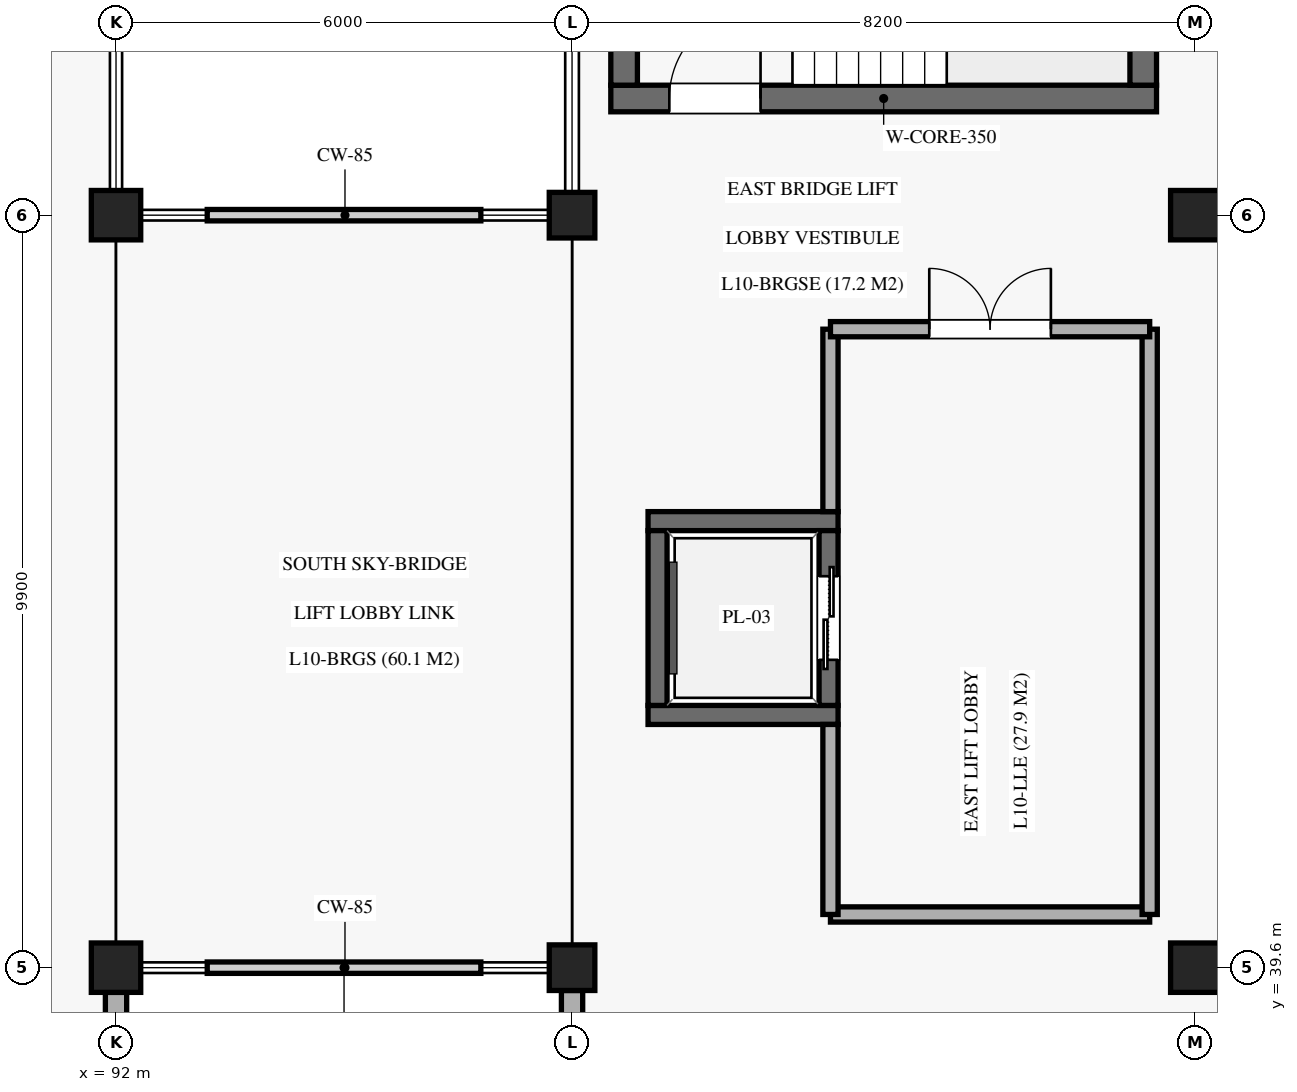
"""IFC4 building model, lengths in metres.
Left out: names, types, materials, properties, quantities, classifications, styles, units other than length and angle.
Written with IfcOpenShell. Run it as: python <this file> out.ifc"""

import sys

from ifc_helpers import new_model, si_unit, direction, frame, frame_2d, origin, origin_2d, place, context, subcontext, project, spatial, rectangle, extrude, element, fill, save


model = new_model("IFC4")
c1 = context("Model", 3, precision=1e-05, world=origin(), true_north=direction((0.0, 1.0)))
c2 = subcontext(c1, "Body", "Model", "MODEL_VIEW")
j1 = project(units=[si_unit("LENGTHUNIT", "METRE"), si_unit("PLANEANGLEUNIT", "RADIAN")], contexts=[c1])
p1 = place(None, origin())
s1 = spatial("IfcSite", under=j1, at=p1, CompositionType="ELEMENT")
p2 = place(p1, origin())
s2 = spatial("IfcBuilding", under=s1, at=p2, CompositionType="ELEMENT")
p3 = place(p2, frame((0.0, 0.0, 52.02)))
s3 = spatial("IfcBuildingStorey", under=s2, at=p3, CompositionType="ELEMENT", Elevation=52.02)
for number, where, z_axis, x_axis in (
    (1, (92.0, 39.6, 0.0), (0.0, 0.0, 1.0), (1.0, 0.0, 0.0)),
    (2, (92.0, 49.5, 0.0), (0.0, 0.0, 1.0), (1.0, 0.0, 0.0)),
):
    element("IfcColumn", number, at=place(p3, frame(where, z_axis=z_axis, x_axis=x_axis)), inside=s3, PredefinedType="COLUMN", context=c2, shape_type="SweptSolid", body=[
        extrude(rectangle(XDim=0.65, YDim=0.65, at=origin_2d()), origin(), (0.0, 0.0, 1.0), 5.1),
    ])
for number, where, z_axis, x_axis in (
    (3, (98.0, 39.6, 0.0), (0.0, 0.0, 1.0), (1.0, 0.0, 0.0)),
    (4, (98.0, 49.5, 0.0), (0.0, 0.0, 1.0), (1.0, 0.0, 0.0)),
):
    element("IfcColumn", number, at=place(p3, frame(where, z_axis=z_axis, x_axis=x_axis)), inside=s3, PredefinedType="COLUMN", context=c2, shape_type="SweptSolid", body=[
        extrude(rectangle(XDim=0.6, YDim=0.6, at=origin_2d()), origin(), (0.0, 0.0, 1.0), 5.1),
    ])
for number, where, z_axis, x_axis in (
    (5, (106.2, 39.6, 0.0), (0.0, 0.0, 1.0), (1.0, 0.0, 0.0)),
    (6, (106.2, 49.5, 0.0), (0.0, 0.0, 1.0), (1.0, 0.0, 0.0)),
):
    element("IfcColumn", number, at=place(p3, frame(where, z_axis=z_axis, x_axis=x_axis)), inside=s3, PredefinedType="COLUMN", context=c2, shape_type="SweptSolid", body=[
        extrude(rectangle(XDim=0.65, YDim=0.65, at=origin_2d()), origin(), (0.0, 0.0, 1.0), 5.1),
    ])
p4 = place(p3, frame((92.0, 30.025, 0.0), z_axis=(0.0, 0.0, 1.0), x_axis=(0.0, 1.0, 0.0)))
e7 = element("IfcWall", 7, at=p4, inside=s3, PredefinedType="SOLIDWALL", context=c2, shape_type="SweptSolid", body=[
    extrude(rectangle(XDim=9.25, YDim=0.28, at=frame_2d((4.625, 0.0))), origin(), (0.0, 0.0, 1.0), 4.1),
])
p5 = place(p4, frame((3.625, 0.0, 1.45)))
e8 = element("IfcOpeningElement", 8, at=p5, cuts=e7, PredefinedType="OPENING", context=c2, shape_type="SweptSolid", body=[
    extrude(rectangle(XDim=1.8, YDim=1.7, at=frame_2d((0.9, 0.85))), frame((0.0, 0.15, 0.0), z_axis=(0.0, -1.0, 0.0), x_axis=(1.0, 0.0, 0.0)), (0.0, 0.0, 1.0), 0.3),
])
p6 = place(p3, frame((98.0, 30.0, 0.0), z_axis=(0.0, 0.0, 1.0), x_axis=(0.0, 1.0, 0.0)))
e9 = element("IfcWall", 9, at=p6, inside=s3, PredefinedType="SOLIDWALL", context=c2, shape_type="SweptSolid", body=[
    extrude(rectangle(XDim=9.3, YDim=0.28, at=frame_2d((4.65, 0.0))), origin(), (0.0, 0.0, 1.0), 4.1),
])
p7 = place(p6, frame((3.65, 0.0, 1.45)))
e10 = element("IfcOpeningElement", 10, at=p7, cuts=e9, PredefinedType="OPENING", context=c2, shape_type="SweptSolid", body=[
    extrude(rectangle(XDim=2.5, YDim=1.6, at=frame_2d((1.25, 0.8))), frame((0.0, 0.15, 0.0), z_axis=(0.0, -1.0, 0.0), x_axis=(1.0, 0.0, 0.0)), (0.0, 0.0, 1.0), 0.3),
])
p8 = place(p3, frame((98.51, 51.035, 0.0), z_axis=(0.0, 0.0, 1.0), x_axis=(1.0, 0.0, 0.0)))
e11 = element("IfcWall", 11, at=p8, inside=s3, PredefinedType="SHEAR", context=c2, shape_type="SweptSolid", body=[
    extrude(rectangle(XDim=7.18, YDim=0.35, at=frame_2d((3.59, 0.0))), origin(), (0.0, 0.0, 1.0), 4.85),
])
p9 = place(p8, frame((0.77, 0.0, 0.0)))
e12 = element("IfcOpeningElement", 12, at=p9, cuts=e11, PredefinedType="OPENING", context=c2, shape_type="SweptSolid", body=[
    extrude(rectangle(XDim=1.2, YDim=2.2, at=frame_2d((0.6, 1.1))), frame((0.0, 0.185, 0.0), z_axis=(0.0, -1.0, 0.0), x_axis=(1.0, 0.0, 0.0)), (0.0, 0.0, 1.0), 0.37),
])
for number, where, z_axis, x_axis in (
    (13, (98.685, 51.21, 0.0), (0.0, 0.0, 1.0), (0.0, 1.0, 0.0)),
    (14, (105.515, 51.21, 0.0), (0.0, 0.0, 1.0), (0.0, 1.0, 0.0)),
):
    element("IfcWall", number, at=place(p3, frame(where, z_axis=z_axis, x_axis=x_axis)), inside=s3, PredefinedType="SHEAR", context=c2, shape_type="SweptSolid", body=[
        extrude(rectangle(XDim=6.48, YDim=0.35, at=frame_2d((3.24, 0.0))), origin(), (0.0, 0.0, 1.0), 4.85),
    ])
for number, where, z_axis, x_axis in (
    (15, (99.0, 42.925, 0.0), (0.0, 0.0, 1.0), (1.0, 0.0, 0.0)),
    (16, (99.0, 45.475, 0.0), (0.0, 0.0, 1.0), (1.0, 0.0, 0.0)),
):
    element("IfcWall", number, at=place(p3, frame(where, z_axis=z_axis, x_axis=x_axis)), inside=s3, PredefinedType="SOLIDWALL", context=c2, shape_type="SweptSolid", body=[
        extrude(rectangle(XDim=2.5, YDim=0.25, at=frame_2d((1.25, 0.0))), origin(), (0.0, 0.0, 1.0), 4.83),
    ])
p10 = place(p3, frame((99.125, 43.05, 0.0), z_axis=(0.0, 0.0, 1.0), x_axis=(0.0, 1.0, 0.0)))
e17 = element("IfcWall", 17, at=p10, inside=s3, PredefinedType="SOLIDWALL", context=c2, shape_type="SweptSolid", body=[
    extrude(rectangle(XDim=2.3, YDim=0.25, at=frame_2d((1.15, 0.0))), origin(), (0.0, 0.0, 1.0), 4.83),
])
p11 = place(p3, frame((101.375, 43.05, 0.0), z_axis=(0.0, 0.0, 1.0), x_axis=(0.0, 1.0, 0.0)))
e18 = element("IfcWall", 18, at=p11, inside=s3, PredefinedType="SOLIDWALL", context=c2, shape_type="SweptSolid", body=[
    extrude(rectangle(XDim=2.3, YDim=0.25, at=frame_2d((1.15, 0.0))), origin(), (0.0, 0.0, 1.0), 4.83),
])
p12 = place(p11, frame((0.6, 0.0, 0.0)))
e19 = element("IfcOpeningElement", 19, at=p12, cuts=e18, PredefinedType="OPENING", context=c2, shape_type="SweptSolid", body=[
    extrude(rectangle(XDim=1.1, YDim=2.2, at=frame_2d((0.55, 1.1))), frame((0.0, 0.135, 0.0), z_axis=(0.0, -1.0, 0.0), x_axis=(1.0, 0.0, 0.0)), (0.0, 0.0, 1.0), 0.27),
])
p13 = place(p3, frame((101.4, 40.3, 0.0), z_axis=(0.0, 0.0, 1.0), x_axis=(1.0, 0.0, 0.0)))
e20 = element("IfcWall", 20, at=p13, inside=s3, PredefinedType="SOLIDWALL", context=c2, shape_type="SweptSolid", body=[
    extrude(rectangle(XDim=4.2, YDim=0.2, at=frame_2d((2.1, 0.0))), origin(), (0.0, 0.0, 1.0), 3.97),
])
p14 = place(p3, frame((101.4, 40.3, 0.0), z_axis=(0.0, 0.0, 1.0), x_axis=(0.0, 1.0, 0.0)))
e21 = element("IfcWall", 21, at=p14, inside=s3, PredefinedType="SOLIDWALL", context=c2, shape_type="SweptSolid", body=[
    extrude(rectangle(XDim=2.5, YDim=0.2, at=frame_2d((1.25, 0.0))), origin(), (0.0, 0.0, 1.0), 3.97),
])
p15 = place(p3, frame((101.4, 45.6, 0.0), z_axis=(0.0, 0.0, 1.0), x_axis=(0.0, 1.0, 0.0)))
e22 = element("IfcWall", 22, at=p15, inside=s3, PredefinedType="SOLIDWALL", context=c2, shape_type="SweptSolid", body=[
    extrude(rectangle(XDim=2.4, YDim=0.2, at=frame_2d((1.2, 0.0))), origin(), (0.0, 0.0, 1.0), 3.97),
])
p16 = place(p3, frame((105.6, 40.3, 0.0), z_axis=(0.0, 0.0, 1.0), x_axis=(0.0, 1.0, 0.0)))
e23 = element("IfcWall", 23, at=p16, inside=s3, PredefinedType="SOLIDWALL", context=c2, shape_type="SweptSolid", body=[
    extrude(rectangle(XDim=7.7, YDim=0.2, at=frame_2d((3.85, 0.0))), origin(), (0.0, 0.0, 1.0), 3.97),
])
p17 = place(p3, frame((101.4, 48.0, 0.0), z_axis=(0.0, 0.0, 1.0), x_axis=(1.0, 0.0, 0.0)))
e24 = element("IfcWall", 24, at=p17, inside=s3, PredefinedType="SOLIDWALL", context=c2, shape_type="SweptSolid", body=[
    extrude(rectangle(XDim=4.2, YDim=0.2, at=frame_2d((2.1, 0.0))), origin(), (0.0, 0.0, 1.0), 3.97),
])
p18 = place(p17, frame((1.3, 0.0, 0.0)))
e25 = element("IfcOpeningElement", 25, at=p18, cuts=e24, PredefinedType="OPENING", context=c2, shape_type="SweptSolid", body=[
    extrude(rectangle(XDim=1.6, YDim=2.2, at=frame_2d((0.8, 1.1))), frame((0.0, 0.11, 0.0), z_axis=(0.0, -1.0, 0.0), x_axis=(1.0, 0.0, 0.0)), (0.0, 0.0, 1.0), 0.22),
])
p19 = place(p9, origin())
e26 = element("IfcDoor", 26, at=p19, inside=s3, OperationType="SINGLE_SWING_RIGHT", PredefinedType="DOOR", context=c2, shape_type="SweptSolid", body=[
    extrude(rectangle(XDim=1.2, YDim=2.2, at=frame_2d((0.6, 1.1))), frame((0.0, 0.025, 0.0), z_axis=(0.0, -1.0, 0.0), x_axis=(1.0, 0.0, 0.0)), (0.0, 0.0, 1.0), 0.05),
])
fill(e12, e26)
p20 = place(p12, origin())
e27 = element("IfcDoor", 27, at=p20, inside=s3, OperationType="DOUBLE_DOOR_SLIDING", PredefinedType="DOOR", context=c2, shape_type="SweptSolid", body=[
    extrude(rectangle(XDim=1.1, YDim=2.2, at=frame_2d((0.55, 1.1))), frame((0.0, 0.025, 0.0), z_axis=(0.0, -1.0, 0.0), x_axis=(1.0, 0.0, 0.0)), (0.0, 0.0, 1.0), 0.05),
])
fill(e19, e27)
p21 = place(p18, origin())
e28 = element("IfcDoor", 28, at=p21, inside=s3, OperationType="DOUBLE_DOOR_SINGLE_SWING", PredefinedType="DOOR", context=c2, shape_type="SweptSolid", body=[
    extrude(rectangle(XDim=1.6, YDim=2.2, at=frame_2d((0.8, 1.1))), frame((0.0, 0.025, 0.0), z_axis=(0.0, -1.0, 0.0), x_axis=(1.0, 0.0, 0.0)), (0.0, 0.0, 1.0), 0.05),
])
fill(e25, e28)
save(model, sys.argv[1])
